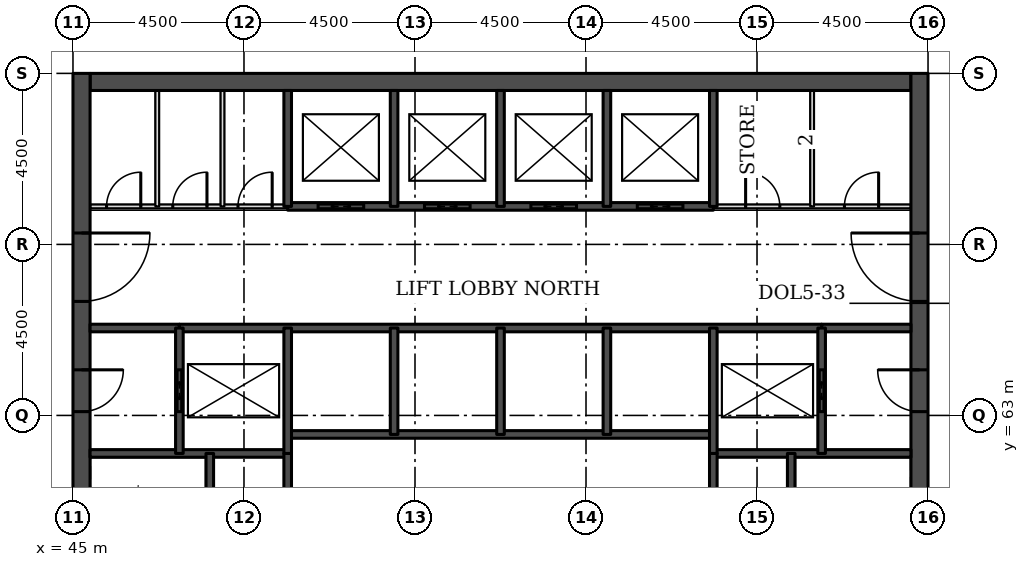
"""IFC4 building model, lengths in metres.
Left out: names, types, materials, properties, quantities, classifications, styles, units other than length and angle.
Written with IfcOpenShell. Run it as: python <this file> out.ifc"""

import sys

from ifc_helpers import new_model, si_unit, direction, frame, frame_2d, origin, place, context, subcontext, project, spatial, rectangle, extrude, element, fill, save


model = new_model("IFC4")
c1 = context("Model", 3, precision=1e-05, world=origin(), true_north=direction((0.0, 1.0)))
c2 = subcontext(c1, "Body", "Model", "MODEL_VIEW")
j1 = project(units=[si_unit("LENGTHUNIT", "METRE"), si_unit("PLANEANGLEUNIT", "RADIAN")], contexts=[c1])
p1 = place(None, origin())
s1 = spatial("IfcSite", under=j1, at=p1, CompositionType="ELEMENT")
p2 = place(p1, origin())
s2 = spatial("IfcBuilding", under=s1, at=p2, CompositionType="ELEMENT")
p3 = place(p2, frame((0.0, 0.0, 112.2)))
s3 = spatial("IfcBuildingStorey", under=s2, at=p3, CompositionType="ELEMENT", Elevation=112.2)
p4 = place(p3, frame((45.45, 71.775, 0.0), z_axis=(0.0, 0.0, 1.0), x_axis=(1.0, 0.0, 0.0)))
e1 = element("IfcWall", 1, at=p4, inside=s3, PredefinedType="SHEAR", context=c2, shape_type="SweptSolid", body=[
    extrude(rectangle(XDim=21.6, YDim=0.45, at=frame_2d((10.8, 0.0))), origin(), (0.0, 0.0, 1.0), 3.7),
])
p5 = place(p3, frame((45.225, 49.5, 0.0), z_axis=(0.0, 0.0, 1.0), x_axis=(0.0, 1.0, 0.0)))
e2 = element("IfcWall", 2, at=p5, inside=s3, PredefinedType="SHEAR", context=c2, shape_type="SweptSolid", body=[
    extrude(rectangle(XDim=22.5, YDim=0.45, at=frame_2d((11.25, 0.0))), origin(), (0.0, 0.0, 1.0), 3.7),
])
p6 = place(p5, frame((4.2, 0.0, 0.0)))
e3 = element("IfcOpeningElement", 3, at=p6, cuts=e2, PredefinedType="OPENING", context=c2, shape_type="SweptSolid", body=[
    extrude(rectangle(XDim=1.8, YDim=2.1, at=frame_2d((0.9, 1.05))), frame((0.0, 0.235, 0.0), z_axis=(0.0, -1.0, 0.0), x_axis=(1.0, 0.0, 0.0)), (0.0, 0.0, 1.0), 0.47),
])
p7 = place(p5, frame((6.9, 0.0, 0.0)))
e4 = element("IfcOpeningElement", 4, at=p7, cuts=e2, PredefinedType="OPENING", context=c2, shape_type="SweptSolid", body=[
    extrude(rectangle(XDim=1.1, YDim=2.1, at=frame_2d((0.55, 1.05))), frame((0.0, 0.235, 0.0), z_axis=(0.0, -1.0, 0.0), x_axis=(1.0, 0.0, 0.0)), (0.0, 0.0, 1.0), 0.47),
])
p8 = place(p5, frame((13.6, 0.0, 0.0)))
e5 = element("IfcOpeningElement", 5, at=p8, cuts=e2, PredefinedType="OPENING", context=c2, shape_type="SweptSolid", body=[
    extrude(rectangle(XDim=1.1, YDim=2.1, at=frame_2d((0.55, 1.05))), frame((0.0, 0.235, 0.0), z_axis=(0.0, -1.0, 0.0), x_axis=(1.0, 0.0, 0.0)), (0.0, 0.0, 1.0), 0.47),
])
p9 = place(p5, frame((16.5, 0.0, 0.0)))
e6 = element("IfcOpeningElement", 6, at=p9, cuts=e2, PredefinedType="OPENING", context=c2, shape_type="SweptSolid", body=[
    extrude(rectangle(XDim=1.8, YDim=2.1, at=frame_2d((0.9, 1.05))), frame((0.0, 0.235, 0.0), z_axis=(0.0, -1.0, 0.0), x_axis=(1.0, 0.0, 0.0)), (0.0, 0.0, 1.0), 0.47),
])
p10 = place(p3, frame((67.275, 49.5, 0.0), z_axis=(0.0, 0.0, 1.0), x_axis=(0.0, 1.0, 0.0)))
e7 = element("IfcWall", 7, at=p10, inside=s3, PredefinedType="SHEAR", context=c2, shape_type="SweptSolid", body=[
    extrude(rectangle(XDim=22.5, YDim=0.45, at=frame_2d((11.25, 0.0))), origin(), (0.0, 0.0, 1.0), 3.7),
])
p11 = place(p10, frame((4.2, 0.0, 0.0)))
e8 = element("IfcOpeningElement", 8, at=p11, cuts=e7, PredefinedType="OPENING", context=c2, shape_type="SweptSolid", body=[
    extrude(rectangle(XDim=1.8, YDim=2.1, at=frame_2d((0.9, 1.05))), frame((0.0, 0.235, 0.0), z_axis=(0.0, -1.0, 0.0), x_axis=(1.0, 0.0, 0.0)), (0.0, 0.0, 1.0), 0.47),
])
p12 = place(p10, frame((6.9, 0.0, 0.0)))
e9 = element("IfcOpeningElement", 9, at=p12, cuts=e7, PredefinedType="OPENING", context=c2, shape_type="SweptSolid", body=[
    extrude(rectangle(XDim=1.1, YDim=2.1, at=frame_2d((0.55, 1.05))), frame((0.0, 0.235, 0.0), z_axis=(0.0, -1.0, 0.0), x_axis=(1.0, 0.0, 0.0)), (0.0, 0.0, 1.0), 0.47),
])
p13 = place(p10, frame((13.6, 0.0, 0.0)))
e10 = element("IfcOpeningElement", 10, at=p13, cuts=e7, PredefinedType="OPENING", context=c2, shape_type="SweptSolid", body=[
    extrude(rectangle(XDim=1.1, YDim=2.1, at=frame_2d((0.55, 1.05))), frame((0.0, 0.235, 0.0), z_axis=(0.0, -1.0, 0.0), x_axis=(1.0, 0.0, 0.0)), (0.0, 0.0, 1.0), 0.47),
])
p14 = place(p10, frame((16.5, 0.0, 0.0)))
e11 = element("IfcOpeningElement", 11, at=p14, cuts=e7, PredefinedType="OPENING", context=c2, shape_type="SweptSolid", body=[
    extrude(rectangle(XDim=1.8, YDim=2.1, at=frame_2d((0.9, 1.05))), frame((0.0, 0.235, 0.0), z_axis=(0.0, -1.0, 0.0), x_axis=(1.0, 0.0, 0.0)), (0.0, 0.0, 1.0), 0.47),
])
for number, where, z_axis, x_axis in (
    (12, (45.45, 62.0, 0.0), (0.0, 0.0, 1.0), (1.0, 0.0, 0.0)),
    (13, (61.85, 62.0, 0.0), (0.0, 0.0, 1.0), (1.0, 0.0, 0.0)),
):
    element("IfcWall", number, at=place(p3, frame(where, z_axis=z_axis, x_axis=x_axis)), inside=s3, PredefinedType="SOLIDWALL", context=c2, shape_type="SweptSolid", body=[
        extrude(rectangle(XDim=5.2, YDim=0.2, at=frame_2d((2.6, 0.0))), origin(), (0.0, 0.0, 1.0), 3.55),
    ])
p15 = place(p3, frame((50.65, 62.5, 0.0), z_axis=(0.0, 0.0, 1.0), x_axis=(1.0, 0.0, 0.0)))
e14 = element("IfcWall", 14, at=p15, inside=s3, PredefinedType="SOLIDWALL", context=c2, shape_type="SweptSolid", body=[
    extrude(rectangle(XDim=11.2, YDim=0.2, at=frame_2d((5.6, 0.0))), origin(), (0.0, 0.0, 1.0), 3.7),
])
for number, where, z_axis, x_axis in (
    (15, (45.45, 65.3, 0.0), (0.0, 0.0, 1.0), (1.0, 0.0, 0.0)),
    (16, (64.7, 65.3, 0.0), (0.0, 0.0, 1.0), (1.0, 0.0, 0.0)),
):
    element("IfcWall", number, at=place(p3, frame(where, z_axis=z_axis, x_axis=x_axis)), inside=s3, PredefinedType="SOLIDWALL", context=c2, shape_type="SweptSolid", body=[
        extrude(rectangle(XDim=2.35, YDim=0.2, at=frame_2d((1.175, 0.0))), origin(), (0.0, 0.0, 1.0), 3.55),
    ])
p16 = place(p3, frame((47.8, 65.3, 0.0), z_axis=(0.0, 0.0, 1.0), x_axis=(1.0, 0.0, 0.0)))
e17 = element("IfcWall", 17, at=p16, inside=s3, PredefinedType="SOLIDWALL", context=c2, shape_type="SweptSolid", body=[
    extrude(rectangle(XDim=16.9, YDim=0.2, at=frame_2d((8.45, 0.0))), origin(), (0.0, 0.0, 1.0), 3.55),
])
p17 = place(p3, frame((45.45, 68.5, 0.0), z_axis=(0.0, 0.0, 1.0), x_axis=(1.0, 0.0, 0.0)))
e18 = element("IfcWall", 18, at=p17, inside=s3, PredefinedType="PARTITIONING", context=c2, shape_type="SweptSolid", body=[
    extrude(rectangle(XDim=5.2, YDim=0.1, at=frame_2d((2.6, 0.0))), origin(), (0.0, 0.0, 1.0), 3.55),
])
p18 = place(p17, frame((0.434, 0.0, 0.0)))
e19 = element("IfcOpeningElement", 19, at=p18, cuts=e18, PredefinedType="OPENING", context=c2, shape_type="SweptSolid", body=[
    extrude(rectangle(XDim=0.9, YDim=2.1, at=frame_2d((0.45, 1.05))), frame((0.0, 0.06, 0.0), z_axis=(0.0, -1.0, 0.0), x_axis=(1.0, 0.0, 0.0)), (0.0, 0.0, 1.0), 0.12),
])
p19 = place(p17, frame((2.176, 0.0, 0.0)))
e20 = element("IfcOpeningElement", 20, at=p19, cuts=e18, PredefinedType="OPENING", context=c2, shape_type="SweptSolid", body=[
    extrude(rectangle(XDim=0.9, YDim=2.1, at=frame_2d((0.45, 1.05))), frame((0.0, 0.06, 0.0), z_axis=(0.0, -1.0, 0.0), x_axis=(1.0, 0.0, 0.0)), (0.0, 0.0, 1.0), 0.12),
])
p20 = place(p17, frame((3.892, 0.0, 0.0)))
e21 = element("IfcOpeningElement", 21, at=p20, cuts=e18, PredefinedType="OPENING", context=c2, shape_type="SweptSolid", body=[
    extrude(rectangle(XDim=0.9, YDim=2.1, at=frame_2d((0.45, 1.05))), frame((0.0, 0.06, 0.0), z_axis=(0.0, -1.0, 0.0), x_axis=(1.0, 0.0, 0.0)), (0.0, 0.0, 1.0), 0.12),
])
p21 = place(p3, frame((61.85, 68.5, 0.0), z_axis=(0.0, 0.0, 1.0), x_axis=(1.0, 0.0, 0.0)))
e22 = element("IfcWall", 22, at=p21, inside=s3, PredefinedType="PARTITIONING", context=c2, shape_type="SweptSolid", body=[
    extrude(rectangle(XDim=5.2, YDim=0.1, at=frame_2d((2.6, 0.0))), origin(), (0.0, 0.0, 1.0), 3.55),
])
p22 = place(p21, frame((3.45, 0.0, 0.0)))
e23 = element("IfcOpeningElement", 23, at=p22, cuts=e22, PredefinedType="OPENING", context=c2, shape_type="SweptSolid", body=[
    extrude(rectangle(XDim=0.9, YDim=2.1, at=frame_2d((0.45, 1.05))), frame((0.0, 0.06, 0.0), z_axis=(0.0, -1.0, 0.0), x_axis=(1.0, 0.0, 0.0)), (0.0, 0.0, 1.0), 0.12),
])
p23 = place(p21, frame((0.85, 0.0, 0.0)))
e24 = element("IfcOpeningElement", 24, at=p23, cuts=e22, PredefinedType="OPENING", context=c2, shape_type="SweptSolid", body=[
    extrude(rectangle(XDim=0.9, YDim=2.1, at=frame_2d((0.45, 1.05))), frame((0.0, 0.06, 0.0), z_axis=(0.0, -1.0, 0.0), x_axis=(1.0, 0.0, 0.0)), (0.0, 0.0, 1.0), 0.12),
])
p24 = place(p3, frame((50.65, 68.5, 0.0), z_axis=(0.0, 0.0, 1.0), x_axis=(1.0, 0.0, 0.0)))
e25 = element("IfcWall", 25, at=p24, inside=s3, PredefinedType="SOLIDWALL", context=c2, shape_type="SweptSolid", body=[
    extrude(rectangle(XDim=11.2, YDim=0.2, at=frame_2d((5.6, 0.0))), origin(), (0.0, 0.0, 1.0), 3.55),
])
p25 = place(p24, frame((0.8, 0.0, 0.0)))
e26 = element("IfcOpeningElement", 26, at=p25, cuts=e25, PredefinedType="OPENING", context=c2, shape_type="SweptSolid", body=[
    extrude(rectangle(XDim=1.2, YDim=2.1, at=frame_2d((0.6, 1.05))), frame((0.0, 0.11, 0.0), z_axis=(0.0, -1.0, 0.0), x_axis=(1.0, 0.0, 0.0)), (0.0, 0.0, 1.0), 0.22),
])
p26 = place(p24, frame((3.6, 0.0, 0.0)))
e27 = element("IfcOpeningElement", 27, at=p26, cuts=e25, PredefinedType="OPENING", context=c2, shape_type="SweptSolid", body=[
    extrude(rectangle(XDim=1.2, YDim=2.1, at=frame_2d((0.6, 1.05))), frame((0.0, 0.11, 0.0), z_axis=(0.0, -1.0, 0.0), x_axis=(1.0, 0.0, 0.0)), (0.0, 0.0, 1.0), 0.22),
])
p27 = place(p24, frame((6.4, 0.0, 0.0)))
e28 = element("IfcOpeningElement", 28, at=p27, cuts=e25, PredefinedType="OPENING", context=c2, shape_type="SweptSolid", body=[
    extrude(rectangle(XDim=1.2, YDim=2.1, at=frame_2d((0.6, 1.05))), frame((0.0, 0.11, 0.0), z_axis=(0.0, -1.0, 0.0), x_axis=(1.0, 0.0, 0.0)), (0.0, 0.0, 1.0), 0.22),
])
p28 = place(p24, frame((9.2, 0.0, 0.0)))
e29 = element("IfcOpeningElement", 29, at=p28, cuts=e25, PredefinedType="OPENING", context=c2, shape_type="SweptSolid", body=[
    extrude(rectangle(XDim=1.2, YDim=2.1, at=frame_2d((0.6, 1.05))), frame((0.0, 0.11, 0.0), z_axis=(0.0, -1.0, 0.0), x_axis=(1.0, 0.0, 0.0)), (0.0, 0.0, 1.0), 0.22),
])
p29 = place(p3, frame((47.218, 68.5, 0.0), z_axis=(0.0, 0.0, 1.0), x_axis=(0.0, 1.0, 0.0)))
e30 = element("IfcWall", 30, at=p29, inside=s3, PredefinedType="PARTITIONING", context=c2, shape_type="SweptSolid", body=[
    extrude(rectangle(XDim=3.05, YDim=0.1, at=frame_2d((1.525, 0.0))), origin(), (0.0, 0.0, 1.0), 3.55),
])
p30 = place(p3, frame((47.8, 62.0, 0.0), z_axis=(0.0, 0.0, 1.0), x_axis=(0.0, 1.0, 0.0)))
e31 = element("IfcWall", 31, at=p30, inside=s3, PredefinedType="SOLIDWALL", context=c2, shape_type="SweptSolid", body=[
    extrude(rectangle(XDim=3.3, YDim=0.2, at=frame_2d((1.65, 0.0))), origin(), (0.0, 0.0, 1.0), 3.55),
])
p31 = place(p30, frame((1.1, 0.0, 0.0)))
e32 = element("IfcOpeningElement", 32, at=p31, cuts=e31, PredefinedType="OPENING", context=c2, shape_type="SweptSolid", body=[
    extrude(rectangle(XDim=1.1, YDim=2.1, at=frame_2d((0.55, 1.05))), frame((0.0, 0.11, 0.0), z_axis=(0.0, -1.0, 0.0), x_axis=(1.0, 0.0, 0.0)), (0.0, 0.0, 1.0), 0.22),
])
p32 = place(p3, frame((48.6, 56.2, 0.0), z_axis=(0.0, 0.0, 1.0), x_axis=(0.0, 1.0, 0.0)))
e33 = element("IfcWall", 33, at=p32, inside=s3, PredefinedType="SOLIDWALL", context=c2, shape_type="SweptSolid", body=[
    extrude(rectangle(XDim=5.8, YDim=0.2, at=frame_2d((2.9, 0.0))), origin(), (0.0, 0.0, 1.0), 3.55),
])
p33 = place(p3, frame((48.934, 68.5, 0.0), z_axis=(0.0, 0.0, 1.0), x_axis=(0.0, 1.0, 0.0)))
e34 = element("IfcWall", 34, at=p33, inside=s3, PredefinedType="PARTITIONING", context=c2, shape_type="SweptSolid", body=[
    extrude(rectangle(XDim=3.05, YDim=0.1, at=frame_2d((1.525, 0.0))), origin(), (0.0, 0.0, 1.0), 3.55),
])
p34 = place(p3, frame((50.65, 59.0, 0.0), z_axis=(0.0, 0.0, 1.0), x_axis=(0.0, 1.0, 0.0)))
e35 = element("IfcWall", 35, at=p34, inside=s3, PredefinedType="SOLIDWALL", context=c2, shape_type="SweptSolid", body=[
    extrude(rectangle(XDim=3.0, YDim=0.2, at=frame_2d((1.5, 0.0))), origin(), (0.0, 0.0, 1.0), 3.7),
])
p35 = place(p3, frame((50.65, 62.0, 0.0), z_axis=(0.0, 0.0, 1.0), x_axis=(0.0, 1.0, 0.0)))
e36 = element("IfcWall", 36, at=p35, inside=s3, PredefinedType="SOLIDWALL", context=c2, shape_type="SweptSolid", body=[
    extrude(rectangle(XDim=3.3, YDim=0.2, at=frame_2d((1.65, 0.0))), origin(), (0.0, 0.0, 1.0), 3.55),
])
p36 = place(p3, frame((50.65, 68.5, 0.0), z_axis=(0.0, 0.0, 1.0), x_axis=(0.0, 1.0, 0.0)))
e37 = element("IfcWall", 37, at=p36, inside=s3, PredefinedType="SOLIDWALL", context=c2, shape_type="SweptSolid", body=[
    extrude(rectangle(XDim=3.05, YDim=0.2, at=frame_2d((1.525, 0.0))), origin(), (0.0, 0.0, 1.0), 3.55),
])
p37 = place(p3, frame((53.45, 62.5, 0.0), z_axis=(0.0, 0.0, 1.0), x_axis=(0.0, 1.0, 0.0)))
e38 = element("IfcWall", 38, at=p37, inside=s3, PredefinedType="SOLIDWALL", context=c2, shape_type="SweptSolid", body=[
    extrude(rectangle(XDim=2.8, YDim=0.2, at=frame_2d((1.4, 0.0))), origin(), (0.0, 0.0, 1.0), 3.55),
])
p38 = place(p3, frame((53.45, 68.5, 0.0), z_axis=(0.0, 0.0, 1.0), x_axis=(0.0, 1.0, 0.0)))
e39 = element("IfcWall", 39, at=p38, inside=s3, PredefinedType="SOLIDWALL", context=c2, shape_type="SweptSolid", body=[
    extrude(rectangle(XDim=3.05, YDim=0.2, at=frame_2d((1.525, 0.0))), origin(), (0.0, 0.0, 1.0), 3.55),
])
p39 = place(p3, frame((56.25, 62.5, 0.0), z_axis=(0.0, 0.0, 1.0), x_axis=(0.0, 1.0, 0.0)))
e40 = element("IfcWall", 40, at=p39, inside=s3, PredefinedType="SOLIDWALL", context=c2, shape_type="SweptSolid", body=[
    extrude(rectangle(XDim=2.8, YDim=0.2, at=frame_2d((1.4, 0.0))), origin(), (0.0, 0.0, 1.0), 3.55),
])
p40 = place(p3, frame((56.25, 68.5, 0.0), z_axis=(0.0, 0.0, 1.0), x_axis=(0.0, 1.0, 0.0)))
e41 = element("IfcWall", 41, at=p40, inside=s3, PredefinedType="SOLIDWALL", context=c2, shape_type="SweptSolid", body=[
    extrude(rectangle(XDim=3.05, YDim=0.2, at=frame_2d((1.525, 0.0))), origin(), (0.0, 0.0, 1.0), 3.55),
])
p41 = place(p3, frame((59.05, 62.5, 0.0), z_axis=(0.0, 0.0, 1.0), x_axis=(0.0, 1.0, 0.0)))
e42 = element("IfcWall", 42, at=p41, inside=s3, PredefinedType="SOLIDWALL", context=c2, shape_type="SweptSolid", body=[
    extrude(rectangle(XDim=2.8, YDim=0.2, at=frame_2d((1.4, 0.0))), origin(), (0.0, 0.0, 1.0), 3.55),
])
p42 = place(p3, frame((59.05, 68.5, 0.0), z_axis=(0.0, 0.0, 1.0), x_axis=(0.0, 1.0, 0.0)))
e43 = element("IfcWall", 43, at=p42, inside=s3, PredefinedType="SOLIDWALL", context=c2, shape_type="SweptSolid", body=[
    extrude(rectangle(XDim=3.05, YDim=0.2, at=frame_2d((1.525, 0.0))), origin(), (0.0, 0.0, 1.0), 3.55),
])
p43 = place(p3, frame((61.85, 59.0, 0.0), z_axis=(0.0, 0.0, 1.0), x_axis=(0.0, 1.0, 0.0)))
e44 = element("IfcWall", 44, at=p43, inside=s3, PredefinedType="SOLIDWALL", context=c2, shape_type="SweptSolid", body=[
    extrude(rectangle(XDim=3.0, YDim=0.2, at=frame_2d((1.5, 0.0))), origin(), (0.0, 0.0, 1.0), 3.7),
])
p44 = place(p3, frame((61.85, 62.0, 0.0), z_axis=(0.0, 0.0, 1.0), x_axis=(0.0, 1.0, 0.0)))
e45 = element("IfcWall", 45, at=p44, inside=s3, PredefinedType="SOLIDWALL", context=c2, shape_type="SweptSolid", body=[
    extrude(rectangle(XDim=3.3, YDim=0.2, at=frame_2d((1.65, 0.0))), origin(), (0.0, 0.0, 1.0), 3.55),
])
p45 = place(p3, frame((61.85, 68.5, 0.0), z_axis=(0.0, 0.0, 1.0), x_axis=(0.0, 1.0, 0.0)))
e46 = element("IfcWall", 46, at=p45, inside=s3, PredefinedType="SOLIDWALL", context=c2, shape_type="SweptSolid", body=[
    extrude(rectangle(XDim=3.05, YDim=0.2, at=frame_2d((1.525, 0.0))), origin(), (0.0, 0.0, 1.0), 3.55),
])
p46 = place(p3, frame((63.9, 56.2, 0.0), z_axis=(0.0, 0.0, 1.0), x_axis=(0.0, 1.0, 0.0)))
e47 = element("IfcWall", 47, at=p46, inside=s3, PredefinedType="SOLIDWALL", context=c2, shape_type="SweptSolid", body=[
    extrude(rectangle(XDim=5.8, YDim=0.2, at=frame_2d((2.9, 0.0))), origin(), (0.0, 0.0, 1.0), 3.55),
])
p47 = place(p3, frame((64.45, 68.5, 0.0), z_axis=(0.0, 0.0, 1.0), x_axis=(0.0, 1.0, 0.0)))
e48 = element("IfcWall", 48, at=p47, inside=s3, PredefinedType="PARTITIONING", context=c2, shape_type="SweptSolid", body=[
    extrude(rectangle(XDim=3.05, YDim=0.1, at=frame_2d((1.525, 0.0))), origin(), (0.0, 0.0, 1.0), 3.55),
])
p48 = place(p3, frame((64.7, 62.0, 0.0), z_axis=(0.0, 0.0, 1.0), x_axis=(0.0, 1.0, 0.0)))
e49 = element("IfcWall", 49, at=p48, inside=s3, PredefinedType="SOLIDWALL", context=c2, shape_type="SweptSolid", body=[
    extrude(rectangle(XDim=3.3, YDim=0.2, at=frame_2d((1.65, 0.0))), origin(), (0.0, 0.0, 1.0), 3.55),
])
p49 = place(p48, frame((1.1, 0.0, 0.0)))
e50 = element("IfcOpeningElement", 50, at=p49, cuts=e49, PredefinedType="OPENING", context=c2, shape_type="SweptSolid", body=[
    extrude(rectangle(XDim=1.1, YDim=2.1, at=frame_2d((0.55, 1.05))), frame((0.0, 0.11, 0.0), z_axis=(0.0, -1.0, 0.0), x_axis=(1.0, 0.0, 0.0)), (0.0, 0.0, 1.0), 0.22),
])
p50 = place(p25, origin())
e51 = element("IfcDoor", 51, at=p50, inside=s3, OperationType="DOUBLE_DOOR_SLIDING", PredefinedType="DOOR", context=c2, shape_type="SweptSolid", body=[
    extrude(rectangle(XDim=1.2, YDim=2.1, at=frame_2d((0.6, 1.05))), frame((0.0, 0.025, 0.0), z_axis=(0.0, -1.0, 0.0), x_axis=(1.0, 0.0, 0.0)), (0.0, 0.0, 1.0), 0.05),
])
fill(e26, e51)
p51 = place(p26, origin())
e52 = element("IfcDoor", 52, at=p51, inside=s3, OperationType="DOUBLE_DOOR_SLIDING", PredefinedType="DOOR", context=c2, shape_type="SweptSolid", body=[
    extrude(rectangle(XDim=1.2, YDim=2.1, at=frame_2d((0.6, 1.05))), frame((0.0, 0.025, 0.0), z_axis=(0.0, -1.0, 0.0), x_axis=(1.0, 0.0, 0.0)), (0.0, 0.0, 1.0), 0.05),
])
fill(e27, e52)
p52 = place(p27, origin())
e53 = element("IfcDoor", 53, at=p52, inside=s3, OperationType="DOUBLE_DOOR_SLIDING", PredefinedType="DOOR", context=c2, shape_type="SweptSolid", body=[
    extrude(rectangle(XDim=1.2, YDim=2.1, at=frame_2d((0.6, 1.05))), frame((0.0, 0.025, 0.0), z_axis=(0.0, -1.0, 0.0), x_axis=(1.0, 0.0, 0.0)), (0.0, 0.0, 1.0), 0.05),
])
fill(e28, e53)
p53 = place(p28, origin())
e54 = element("IfcDoor", 54, at=p53, inside=s3, OperationType="DOUBLE_DOOR_SLIDING", PredefinedType="DOOR", context=c2, shape_type="SweptSolid", body=[
    extrude(rectangle(XDim=1.2, YDim=2.1, at=frame_2d((0.6, 1.05))), frame((0.0, 0.025, 0.0), z_axis=(0.0, -1.0, 0.0), x_axis=(1.0, 0.0, 0.0)), (0.0, 0.0, 1.0), 0.05),
])
fill(e29, e54)
p54 = place(p31, origin())
e55 = element("IfcDoor", 55, at=p54, inside=s3, OperationType="DOUBLE_DOOR_SLIDING", PredefinedType="DOOR", context=c2, shape_type="SweptSolid", body=[
    extrude(rectangle(XDim=1.1, YDim=2.1, at=frame_2d((0.55, 1.05))), frame((0.0, 0.025, 0.0), z_axis=(0.0, -1.0, 0.0), x_axis=(1.0, 0.0, 0.0)), (0.0, 0.0, 1.0), 0.05),
])
fill(e32, e55)
p55 = place(p49, origin())
e56 = element("IfcDoor", 56, at=p55, inside=s3, OperationType="DOUBLE_DOOR_SLIDING", PredefinedType="DOOR", context=c2, shape_type="SweptSolid", body=[
    extrude(rectangle(XDim=1.1, YDim=2.1, at=frame_2d((0.55, 1.05))), frame((0.0, 0.025, 0.0), z_axis=(0.0, -1.0, 0.0), x_axis=(1.0, 0.0, 0.0)), (0.0, 0.0, 1.0), 0.05),
])
fill(e50, e56)
p56 = place(p8, frame((1.1, 0.0, 0.0), z_axis=(0.0, 0.0, 1.0), x_axis=(-1.0, 0.0, 0.0)))
e57 = element("IfcDoor", 57, at=p56, inside=s3, OperationType="SINGLE_SWING_LEFT", PredefinedType="DOOR", context=c2, shape_type="SweptSolid", body=[
    extrude(rectangle(XDim=1.1, YDim=2.1, at=frame_2d((0.55, 1.05))), frame((0.0, 0.025, 0.0), z_axis=(0.0, -1.0, 0.0), x_axis=(1.0, 0.0, 0.0)), (0.0, 0.0, 1.0), 0.05),
])
fill(e5, e57)
p57 = place(p9, frame((1.8, 0.0, 0.0), z_axis=(0.0, 0.0, 1.0), x_axis=(-1.0, 0.0, 0.0)))
e58 = element("IfcDoor", 58, at=p57, inside=s3, OperationType="SINGLE_SWING_LEFT", PredefinedType="DOOR", context=c2, shape_type="SweptSolid", body=[
    extrude(rectangle(XDim=1.8, YDim=2.1, at=frame_2d((0.9, 1.05))), frame((0.0, 0.025, 0.0), z_axis=(0.0, -1.0, 0.0), x_axis=(1.0, 0.0, 0.0)), (0.0, 0.0, 1.0), 0.05),
])
fill(e6, e58)
p58 = place(p13, origin())
e59 = element("IfcDoor", 59, at=p58, inside=s3, OperationType="SINGLE_SWING_RIGHT", PredefinedType="DOOR", context=c2, shape_type="SweptSolid", body=[
    extrude(rectangle(XDim=1.1, YDim=2.1, at=frame_2d((0.55, 1.05))), frame((0.0, 0.025, 0.0), z_axis=(0.0, -1.0, 0.0), x_axis=(1.0, 0.0, 0.0)), (0.0, 0.0, 1.0), 0.05),
])
fill(e10, e59)
p59 = place(p14, origin())
e60 = element("IfcDoor", 60, at=p59, inside=s3, OperationType="SINGLE_SWING_RIGHT", PredefinedType="DOOR", context=c2, shape_type="SweptSolid", body=[
    extrude(rectangle(XDim=1.8, YDim=2.1, at=frame_2d((0.9, 1.05))), frame((0.0, 0.025, 0.0), z_axis=(0.0, -1.0, 0.0), x_axis=(1.0, 0.0, 0.0)), (0.0, 0.0, 1.0), 0.05),
])
fill(e11, e60)
p60 = place(p22, origin())
e61 = element("IfcDoor", 61, at=p60, inside=s3, OperationType="SINGLE_SWING_RIGHT", PredefinedType="DOOR", context=c2, shape_type="SweptSolid", body=[
    extrude(rectangle(XDim=0.9, YDim=2.1, at=frame_2d((0.45, 1.05))), frame((0.0, 0.025, 0.0), z_axis=(0.0, -1.0, 0.0), x_axis=(1.0, 0.0, 0.0)), (0.0, 0.0, 1.0), 0.05),
])
fill(e23, e61)
p61 = place(p23, origin())
e62 = element("IfcDoor", 62, at=p61, inside=s3, OperationType="SINGLE_SWING_LEFT", PredefinedType="DOOR", context=c2, shape_type="SweptSolid", body=[
    extrude(rectangle(XDim=0.9, YDim=2.1, at=frame_2d((0.45, 1.05))), frame((0.0, 0.025, 0.0), z_axis=(0.0, -1.0, 0.0), x_axis=(1.0, 0.0, 0.0)), (0.0, 0.0, 1.0), 0.05),
])
fill(e24, e62)
p62 = place(p18, origin())
e63 = element("IfcDoor", 63, at=p62, inside=s3, OperationType="SINGLE_SWING_RIGHT", PredefinedType="DOOR", context=c2, shape_type="SweptSolid", body=[
    extrude(rectangle(XDim=0.9, YDim=2.1, at=frame_2d((0.45, 1.05))), frame((0.0, 0.025, 0.0), z_axis=(0.0, -1.0, 0.0), x_axis=(1.0, 0.0, 0.0)), (0.0, 0.0, 1.0), 0.05),
])
fill(e19, e63)
p63 = place(p19, origin())
e64 = element("IfcDoor", 64, at=p63, inside=s3, OperationType="SINGLE_SWING_RIGHT", PredefinedType="DOOR", context=c2, shape_type="SweptSolid", body=[
    extrude(rectangle(XDim=0.9, YDim=2.1, at=frame_2d((0.45, 1.05))), frame((0.0, 0.025, 0.0), z_axis=(0.0, -1.0, 0.0), x_axis=(1.0, 0.0, 0.0)), (0.0, 0.0, 1.0), 0.05),
])
fill(e20, e64)
p64 = place(p20, origin())
e65 = element("IfcDoor", 65, at=p64, inside=s3, OperationType="SINGLE_SWING_RIGHT", PredefinedType="DOOR", context=c2, shape_type="SweptSolid", body=[
    extrude(rectangle(XDim=0.9, YDim=2.1, at=frame_2d((0.45, 1.05))), frame((0.0, 0.025, 0.0), z_axis=(0.0, -1.0, 0.0), x_axis=(1.0, 0.0, 0.0)), (0.0, 0.0, 1.0), 0.05),
])
fill(e21, e65)
save(model, sys.argv[1])
